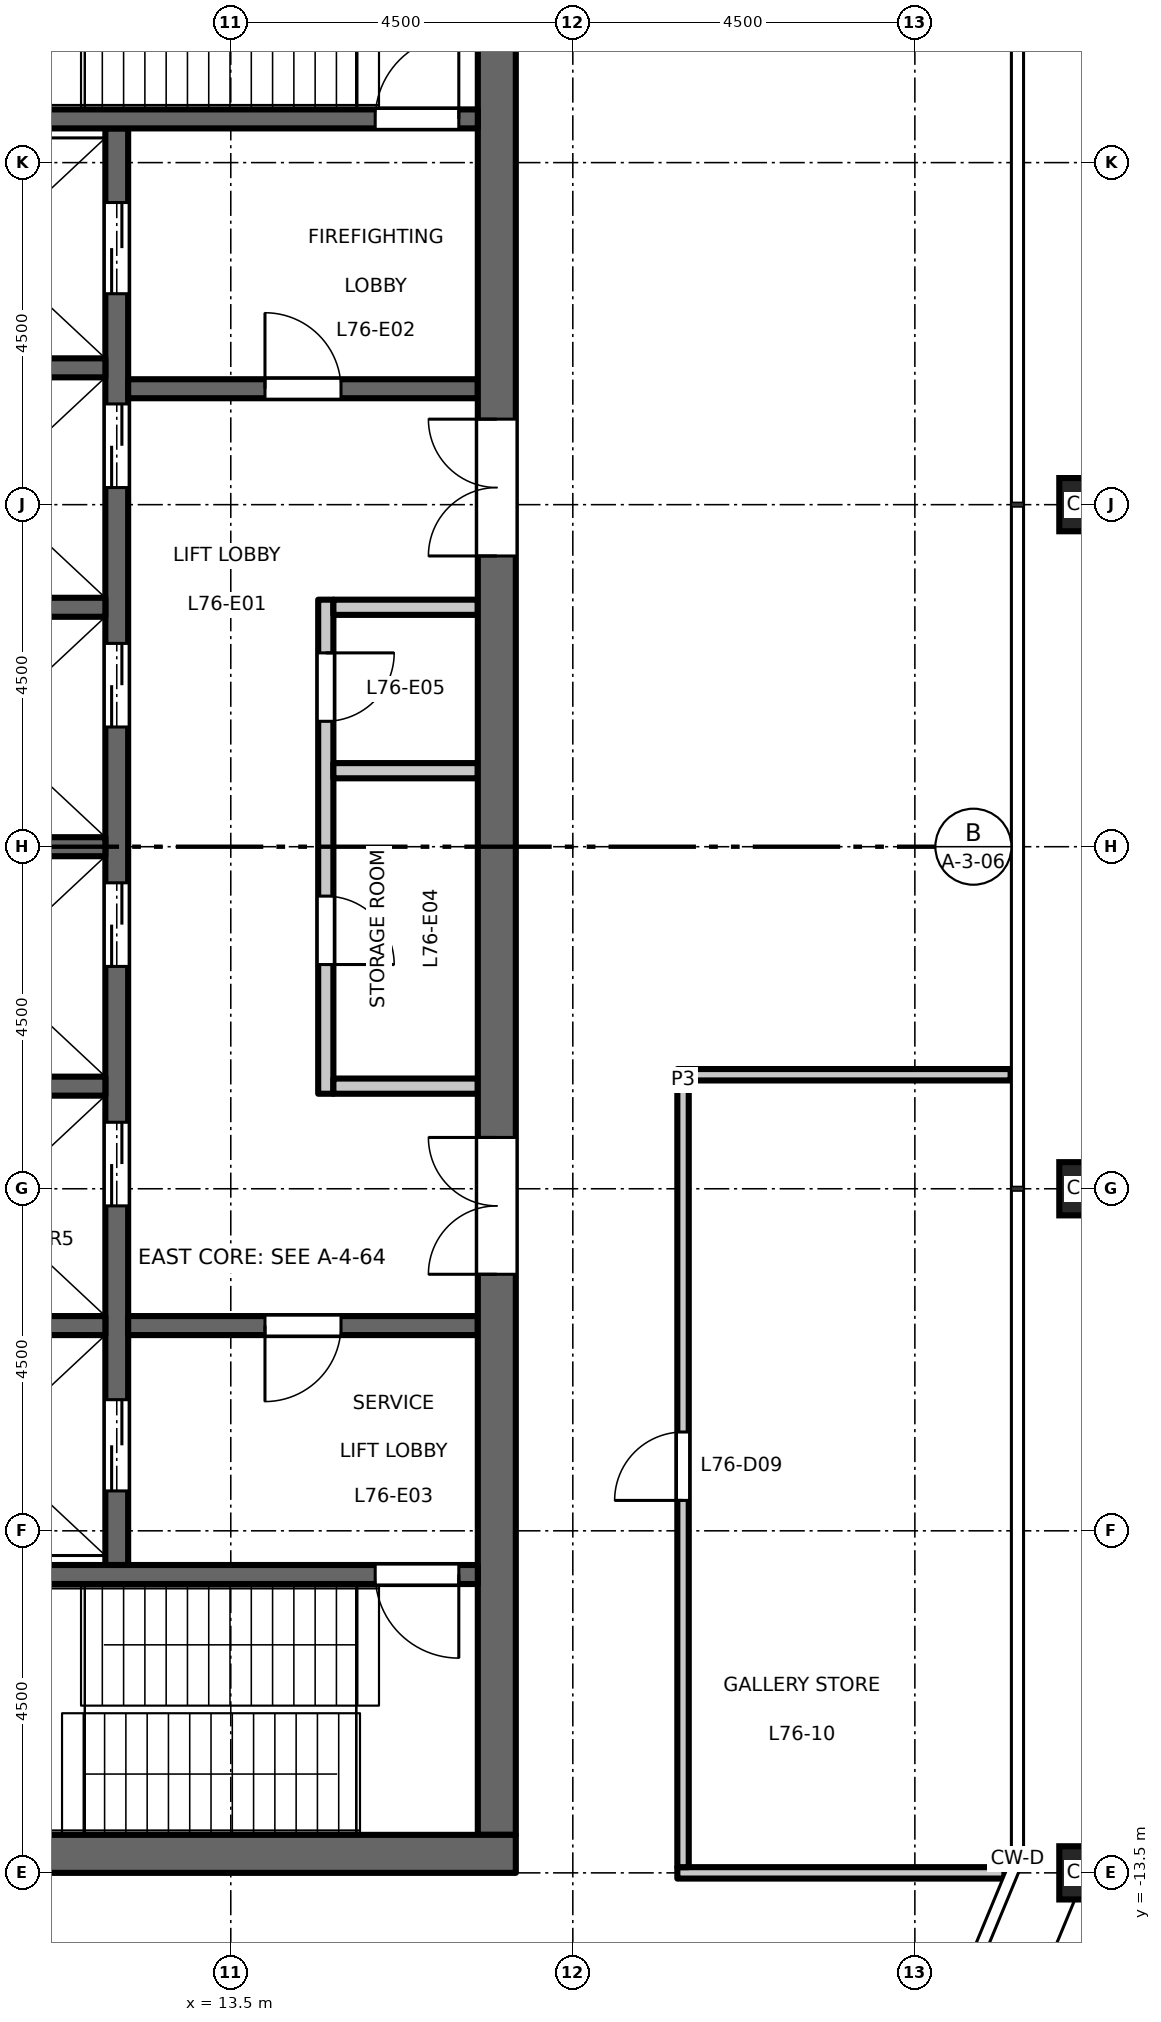
"""IFC4 building model, lengths in metres.
Left out: names, types, materials, properties, quantities, classifications, styles, units other than length and angle.
Written with IfcOpenShell. Run it as: python <this file> out.ifc"""

import sys

from ifc_helpers import new_model, si_unit, direction, frame, frame_2d, origin, origin_2d, place, context, subcontext, project, spatial, rectangle, hollow_rectangle, extrude, element, fill, save


model = new_model("IFC4")
c1 = context("Model", 3, precision=1e-05, world=origin(), true_north=direction((0.0, 1.0)))
c2 = subcontext(c1, "Body", "Model", "MODEL_VIEW")
j1 = project(units=[si_unit("LENGTHUNIT", "METRE"), si_unit("PLANEANGLEUNIT", "RADIAN")], contexts=[c1])
p1 = place(None, origin())
s1 = spatial("IfcSite", under=j1, at=p1, CompositionType="ELEMENT")
p2 = place(p1, origin())
s2 = spatial("IfcBuilding", under=s1, at=p2, CompositionType="ELEMENT")
p3 = place(p2, frame((0.0, 0.0, 353.2)))
s3 = spatial("IfcBuildingStorey", under=s2, at=p3, CompositionType="ELEMENT", Elevation=353.2)
for number, where, z_axis, x_axis in (
    (1, (24.75, -13.5, 0.0), (0.0, 0.0, 1.0), (1.0, 0.0, 0.0)),
    (2, (24.75, -4.5, 0.0), (0.0, 0.0, 1.0), (1.0, 0.0, 0.0)),
    (3, (24.75, 4.5, 0.0), (0.0, 0.0, 1.0), (1.0, 0.0, 0.0)),
):
    element("IfcColumn", number, at=place(p3, frame(where, z_axis=z_axis, x_axis=x_axis)), inside=s3, PredefinedType="COLUMN", context=c2, shape_type="SweptSolid", body=[
        extrude(hollow_rectangle(XDim=0.7, YDim=0.7, WallThickness=0.036, at=origin_2d()), origin(), (0.0, 0.0, 1.0), 5.0),
    ])
p4 = place(p3, frame((14.75, -3.25, 0.0), z_axis=(0.0, 0.0, 1.0), x_axis=(0.0, 1.0, 0.0)))
e4 = element("IfcWall", 4, at=p4, inside=s3, PredefinedType="PARTITIONING", context=c2, shape_type="SweptSolid", body=[
    extrude(rectangle(XDim=6.5, YDim=0.2, at=frame_2d((3.25, 0.0))), origin(), (0.0, 0.0, 1.0), 4.8),
])
p5 = place(p4, frame((1.7, 0.0, 0.0)))
e5 = element("IfcOpeningElement", 5, at=p5, cuts=e4, PredefinedType="OPENING", context=c2, shape_type="SweptSolid", body=[
    extrude(rectangle(XDim=0.9, YDim=2.1, at=frame_2d((0.45, 1.05))), frame((0.0, 0.11, 0.0), z_axis=(0.0, -1.0, 0.0), x_axis=(1.0, 0.0, 0.0)), (0.0, 0.0, 1.0), 0.22),
])
p6 = place(p4, frame((4.9, 0.0, 0.0)))
e6 = element("IfcOpeningElement", 6, at=p6, cuts=e4, PredefinedType="OPENING", context=c2, shape_type="SweptSolid", body=[
    extrude(rectangle(XDim=0.9, YDim=2.1, at=frame_2d((0.45, 1.05))), frame((0.0, 0.11, 0.0), z_axis=(0.0, -1.0, 0.0), x_axis=(1.0, 0.0, 0.0)), (0.0, 0.0, 1.0), 0.22),
])
for number, where, z_axis, x_axis in (
    (7, (14.85, 3.15, 0.0), (0.0, 0.0, 1.0), (1.0, 0.0, 0.0)),
    (8, (14.85, -3.15, 0.0), (0.0, 0.0, 1.0), (1.0, 0.0, 0.0)),
    (9, (14.85, 1.0, 0.0), (0.0, 0.0, 1.0), (1.0, 0.0, 0.0)),
):
    element("IfcWall", number, at=place(p3, frame(where, z_axis=z_axis, x_axis=x_axis)), inside=s3, PredefinedType="PARTITIONING", context=c2, shape_type="SweptSolid", body=[
        extrude(rectangle(XDim=1.9, YDim=0.2, at=frame_2d((0.95, 0.0))), origin(), (0.0, 0.0, 1.0), 4.8),
    ])
p7 = place(p3, frame((12.0, -9.45, 0.0), z_axis=(0.0, 0.0, 1.0), x_axis=(0.0, 1.0, 0.0)))
e10 = element("IfcWall", 10, at=p7, inside=s3, PredefinedType="SHEAR", context=c2, shape_type="SweptSolid", body=[
    extrude(rectangle(XDim=18.9, YDim=0.3, at=frame_2d((9.45, 0.0))), origin(), (0.0, 0.0, 1.0), 4.8),
])
p8 = place(p7, frame((4.725, 0.0, 0.0)))
e11 = element("IfcOpeningElement", 11, at=p8, cuts=e10, PredefinedType="OPENING", context=c2, shape_type="SweptSolid", body=[
    extrude(rectangle(XDim=1.1, YDim=2.1, at=frame_2d((0.55, 1.05))), frame((0.0, 0.16, 0.0), z_axis=(0.0, -1.0, 0.0), x_axis=(1.0, 0.0, 0.0)), (0.0, 0.0, 1.0), 0.32),
])
p9 = place(p7, frame((7.875, 0.0, 0.0)))
e12 = element("IfcOpeningElement", 12, at=p9, cuts=e10, PredefinedType="OPENING", context=c2, shape_type="SweptSolid", body=[
    extrude(rectangle(XDim=1.1, YDim=2.1, at=frame_2d((0.55, 1.05))), frame((0.0, 0.16, 0.0), z_axis=(0.0, -1.0, 0.0), x_axis=(1.0, 0.0, 0.0)), (0.0, 0.0, 1.0), 0.32),
])
p10 = place(p7, frame((11.025, 0.0, 0.0)))
e13 = element("IfcOpeningElement", 13, at=p10, cuts=e10, PredefinedType="OPENING", context=c2, shape_type="SweptSolid", body=[
    extrude(rectangle(XDim=1.1, YDim=2.1, at=frame_2d((0.55, 1.05))), frame((0.0, 0.16, 0.0), z_axis=(0.0, -1.0, 0.0), x_axis=(1.0, 0.0, 0.0)), (0.0, 0.0, 1.0), 0.32),
])
p11 = place(p7, frame((14.175, 0.0, 0.0)))
e14 = element("IfcOpeningElement", 14, at=p11, cuts=e10, PredefinedType="OPENING", context=c2, shape_type="SweptSolid", body=[
    extrude(rectangle(XDim=1.1, YDim=2.1, at=frame_2d((0.55, 1.05))), frame((0.0, 0.16, 0.0), z_axis=(0.0, -1.0, 0.0), x_axis=(1.0, 0.0, 0.0)), (0.0, 0.0, 1.0), 0.32),
])
p12 = place(p7, frame((16.725, 0.0, 0.0)))
e15 = element("IfcOpeningElement", 15, at=p12, cuts=e10, PredefinedType="OPENING", context=c2, shape_type="SweptSolid", body=[
    extrude(rectangle(XDim=1.2, YDim=2.1, at=frame_2d((0.6, 1.05))), frame((0.0, 0.16, 0.0), z_axis=(0.0, -1.0, 0.0), x_axis=(1.0, 0.0, 0.0)), (0.0, 0.0, 1.0), 0.32),
])
p13 = place(p7, frame((0.975, 0.0, 0.0)))
e16 = element("IfcOpeningElement", 16, at=p13, cuts=e10, PredefinedType="OPENING", context=c2, shape_type="SweptSolid", body=[
    extrude(rectangle(XDim=1.2, YDim=2.1, at=frame_2d((0.6, 1.05))), frame((0.0, 0.16, 0.0), z_axis=(0.0, -1.0, 0.0), x_axis=(1.0, 0.0, 0.0)), (0.0, 0.0, 1.0), 0.32),
])
p14 = place(p3, frame((12.15, 6.025, 0.0), z_axis=(0.0, 0.0, 1.0), x_axis=(1.0, 0.0, 0.0)))
e17 = element("IfcWall", 17, at=p14, inside=s3, PredefinedType="SHEAR", context=c2, shape_type="SweptSolid", body=[
    extrude(rectangle(XDim=4.6, YDim=0.25, at=frame_2d((2.3, 0.0))), origin(), (0.0, 0.0, 1.0), 4.8),
])
p15 = place(p14, frame((1.8, 0.0, 0.0)))
e18 = element("IfcOpeningElement", 18, at=p15, cuts=e17, PredefinedType="OPENING", context=c2, shape_type="SweptSolid", body=[
    extrude(rectangle(XDim=1.0, YDim=2.1, at=frame_2d((0.5, 1.05))), frame((0.0, 0.135, 0.0), z_axis=(0.0, -1.0, 0.0), x_axis=(1.0, 0.0, 0.0)), (0.0, 0.0, 1.0), 0.27),
])
p16 = place(p3, frame((12.15, -6.3, 0.0), z_axis=(0.0, 0.0, 1.0), x_axis=(1.0, 0.0, 0.0)))
e19 = element("IfcWall", 19, at=p16, inside=s3, PredefinedType="SHEAR", context=c2, shape_type="SweptSolid", body=[
    extrude(rectangle(XDim=4.6, YDim=0.25, at=frame_2d((2.3, 0.0))), origin(), (0.0, 0.0, 1.0), 4.8),
])
p17 = place(p16, frame((1.8, 0.0, 0.0)))
e20 = element("IfcOpeningElement", 20, at=p17, cuts=e19, PredefinedType="OPENING", context=c2, shape_type="SweptSolid", body=[
    extrude(rectangle(XDim=1.0, YDim=2.1, at=frame_2d((0.5, 1.05))), frame((0.0, 0.135, 0.0), z_axis=(0.0, -1.0, 0.0), x_axis=(1.0, 0.0, 0.0)), (0.0, 0.0, 1.0), 0.27),
])
p18 = place(p3, frame((17.0, -13.0, 0.0), z_axis=(0.0, 0.0, 1.0), x_axis=(0.0, 1.0, 0.0)))
e21 = element("IfcWall", 21, at=p18, inside=s3, PredefinedType="SHEAR", context=c2, shape_type="SweptSolid", body=[
    extrude(rectangle(XDim=26.0, YDim=0.5, at=frame_2d((13.0, 0.0))), origin(), (0.0, 0.0, 1.0), 4.8),
])
p19 = place(p18, frame((16.825, 0.0, 0.0)))
e22 = element("IfcOpeningElement", 22, at=p19, cuts=e21, PredefinedType="OPENING", context=c2, shape_type="SweptSolid", body=[
    extrude(rectangle(XDim=1.8, YDim=2.1, at=frame_2d((0.9, 1.05))), frame((0.0, 0.26, 0.0), z_axis=(0.0, -1.0, 0.0), x_axis=(1.0, 0.0, 0.0)), (0.0, 0.0, 1.0), 0.52),
])
p20 = place(p18, frame((7.375, 0.0, 0.0)))
e23 = element("IfcOpeningElement", 23, at=p20, cuts=e21, PredefinedType="OPENING", context=c2, shape_type="SweptSolid", body=[
    extrude(rectangle(XDim=1.8, YDim=2.1, at=frame_2d((0.9, 1.05))), frame((0.0, 0.26, 0.0), z_axis=(0.0, -1.0, 0.0), x_axis=(1.0, 0.0, 0.0)), (0.0, 0.0, 1.0), 0.52),
])
for number, where, z_axis, x_axis in (
    (24, (8.75, 0.0, 0.0), (0.0, 0.0, 1.0), (1.0, 0.0, 0.0)),
    (25, (8.75, 3.15, 0.0), (0.0, 0.0, 1.0), (1.0, 0.0, 0.0)),
    (26, (8.75, 6.3, 0.0), (0.0, 0.0, 1.0), (1.0, 0.0, 0.0)),
    (27, (8.75, -3.15, 0.0), (0.0, 0.0, 1.0), (1.0, 0.0, 0.0)),
    (28, (8.75, -6.3, 0.0), (0.0, 0.0, 1.0), (1.0, 0.0, 0.0)),
):
    element("IfcWall", number, at=place(p3, frame(where, z_axis=z_axis, x_axis=x_axis)), inside=s3, PredefinedType="SHEAR", context=c2, shape_type="SweptSolid", body=[
        extrude(rectangle(XDim=3.1, YDim=0.25, at=frame_2d((1.55, 0.0))), origin(), (0.0, 0.0, 1.0), 4.8),
    ])
p21 = place(p3, frame((8.75, 9.575, 0.0), z_axis=(0.0, 0.0, 1.0), x_axis=(1.0, 0.0, 0.0)))
e29 = element("IfcWall", 29, at=p21, inside=s3, PredefinedType="SHEAR", context=c2, shape_type="SweptSolid", body=[
    extrude(rectangle(XDim=8.0, YDim=0.25, at=frame_2d((4.0, 0.0))), origin(), (0.0, 0.0, 1.0), 4.8),
])
p22 = place(p21, frame((6.65, 0.0, 0.0)))
e30 = element("IfcOpeningElement", 30, at=p22, cuts=e29, PredefinedType="OPENING", context=c2, shape_type="SweptSolid", body=[
    extrude(rectangle(XDim=1.1, YDim=2.1, at=frame_2d((0.55, 1.05))), frame((0.0, 0.135, 0.0), z_axis=(0.0, -1.0, 0.0), x_axis=(1.0, 0.0, 0.0)), (0.0, 0.0, 1.0), 0.27),
])
p23 = place(p3, frame((8.75, -9.575, 0.0), z_axis=(0.0, 0.0, 1.0), x_axis=(1.0, 0.0, 0.0)))
e31 = element("IfcWall", 31, at=p23, inside=s3, PredefinedType="SHEAR", context=c2, shape_type="SweptSolid", body=[
    extrude(rectangle(XDim=8.0, YDim=0.25, at=frame_2d((4.0, 0.0))), origin(), (0.0, 0.0, 1.0), 4.8),
])
p24 = place(p23, frame((6.65, 0.0, 0.0)))
e32 = element("IfcOpeningElement", 32, at=p24, cuts=e31, PredefinedType="OPENING", context=c2, shape_type="SweptSolid", body=[
    extrude(rectangle(XDim=1.1, YDim=2.1, at=frame_2d((0.55, 1.05))), frame((0.0, 0.135, 0.0), z_axis=(0.0, -1.0, 0.0), x_axis=(1.0, 0.0, 0.0)), (0.0, 0.0, 1.0), 0.27),
])
p25 = place(p3, frame((8.25, -13.25, 0.0), z_axis=(0.0, 0.0, 1.0), x_axis=(1.0, 0.0, 0.0)))
e33 = element("IfcWall", 33, at=p25, inside=s3, PredefinedType="SHEAR", context=c2, shape_type="SweptSolid", body=[
    extrude(rectangle(XDim=9.0, YDim=0.5, at=frame_2d((4.5, 0.0))), origin(), (0.0, 0.0, 1.0), 4.8),
])
p26 = place(p3, frame((19.375, -13.5, 0.0), z_axis=(0.0, 0.0, 1.0), x_axis=(1.0, 0.0, 0.0)))
e34 = element("IfcWall", 34, at=p26, inside=s3, PredefinedType="PARTITIONING", context=c2, shape_type="SweptSolid", body=[
    extrude(rectangle(XDim=4.303, YDim=0.15, at=frame_2d((2.151, 0.0))), origin(), (0.0, 0.0, 1.0), 4.8),
])
p27 = place(p3, frame((19.375, -3.0, 0.0), z_axis=(0.0, 0.0, 1.0), x_axis=(1.0, 0.0, 0.0)))
e35 = element("IfcWall", 35, at=p27, inside=s3, PredefinedType="PARTITIONING", context=c2, shape_type="SweptSolid", body=[
    extrude(rectangle(XDim=4.385, YDim=0.15, at=frame_2d((2.192, 0.0))), origin(), (0.0, 0.0, 1.0), 4.8),
])
p28 = place(p3, frame((19.45, -13.425, 0.0), z_axis=(0.0, 0.0, 1.0), x_axis=(0.0, 1.0, 0.0)))
e36 = element("IfcWall", 36, at=p28, inside=s3, PredefinedType="PARTITIONING", context=c2, shape_type="SweptSolid", body=[
    extrude(rectangle(XDim=10.35, YDim=0.15, at=frame_2d((5.175, 0.0))), origin(), (0.0, 0.0, 1.0), 4.8),
])
p29 = place(p28, frame((4.825, 0.0, 0.0)))
e37 = element("IfcOpeningElement", 37, at=p29, cuts=e36, PredefinedType="OPENING", context=c2, shape_type="SweptSolid", body=[
    extrude(rectangle(XDim=0.9, YDim=2.1, at=frame_2d((0.45, 1.05))), frame((0.0, 0.085, 0.0), z_axis=(0.0, -1.0, 0.0), x_axis=(1.0, 0.0, 0.0)), (0.0, 0.0, 1.0), 0.17),
])
p30 = place(p15, origin())
e38 = element("IfcDoor", 38, at=p30, inside=s3, OperationType="SINGLE_SWING_RIGHT", PredefinedType="DOOR", context=c2, shape_type="SweptSolid", body=[
    extrude(rectangle(XDim=1.0, YDim=2.1, at=frame_2d((0.5, 1.05))), frame((0.0, 0.025, 0.0), z_axis=(0.0, -1.0, 0.0), x_axis=(1.0, 0.0, 0.0)), (0.0, 0.0, 1.0), 0.05),
])
fill(e18, e38)
p31 = place(p17, origin())
e39 = element("IfcDoor", 39, at=p31, inside=s3, OperationType="SINGLE_SWING_LEFT", PredefinedType="DOOR", context=c2, shape_type="SweptSolid", body=[
    extrude(rectangle(XDim=1.0, YDim=2.1, at=frame_2d((0.5, 1.05))), frame((0.0, 0.025, 0.0), z_axis=(0.0, -1.0, 0.0), x_axis=(1.0, 0.0, 0.0)), (0.0, 0.0, 1.0), 0.05),
])
fill(e20, e39)
p32 = place(p22, origin())
e40 = element("IfcDoor", 40, at=p32, inside=s3, OperationType="SINGLE_SWING_LEFT", PredefinedType="DOOR", context=c2, shape_type="SweptSolid", body=[
    extrude(rectangle(XDim=1.1, YDim=2.1, at=frame_2d((0.55, 1.05))), frame((0.0, 0.025, 0.0), z_axis=(0.0, -1.0, 0.0), x_axis=(1.0, 0.0, 0.0)), (0.0, 0.0, 1.0), 0.05),
])
fill(e30, e40)
p33 = place(p24, origin())
e41 = element("IfcDoor", 41, at=p33, inside=s3, OperationType="SINGLE_SWING_RIGHT", PredefinedType="DOOR", context=c2, shape_type="SweptSolid", body=[
    extrude(rectangle(XDim=1.1, YDim=2.1, at=frame_2d((0.55, 1.05))), frame((0.0, 0.025, 0.0), z_axis=(0.0, -1.0, 0.0), x_axis=(1.0, 0.0, 0.0)), (0.0, 0.0, 1.0), 0.05),
])
fill(e32, e41)
p34 = place(p19, origin())
e42 = element("IfcDoor", 42, at=p34, inside=s3, OperationType="DOUBLE_DOOR_DOUBLE_SWING", PredefinedType="DOOR", context=c2, shape_type="SweptSolid", body=[
    extrude(rectangle(XDim=1.8, YDim=2.1, at=frame_2d((0.9, 1.05))), frame((0.0, 0.025, 0.0), z_axis=(0.0, -1.0, 0.0), x_axis=(1.0, 0.0, 0.0)), (0.0, 0.0, 1.0), 0.05),
])
fill(e22, e42)
p35 = place(p20, origin())
e43 = element("IfcDoor", 43, at=p35, inside=s3, OperationType="DOUBLE_DOOR_DOUBLE_SWING", PredefinedType="DOOR", context=c2, shape_type="SweptSolid", body=[
    extrude(rectangle(XDim=1.8, YDim=2.1, at=frame_2d((0.9, 1.05))), frame((0.0, 0.025, 0.0), z_axis=(0.0, -1.0, 0.0), x_axis=(1.0, 0.0, 0.0)), (0.0, 0.0, 1.0), 0.05),
])
fill(e23, e43)
p36 = place(p8, origin())
e44 = element("IfcDoor", 44, at=p36, inside=s3, OperationType="DOUBLE_DOOR_SLIDING", PredefinedType="DOOR", context=c2, shape_type="SweptSolid", body=[
    extrude(rectangle(XDim=1.1, YDim=2.1, at=frame_2d((0.55, 1.05))), frame((0.0, 0.025, 0.0), z_axis=(0.0, -1.0, 0.0), x_axis=(1.0, 0.0, 0.0)), (0.0, 0.0, 1.0), 0.05),
])
fill(e11, e44)
p37 = place(p9, origin())
e45 = element("IfcDoor", 45, at=p37, inside=s3, OperationType="DOUBLE_DOOR_SLIDING", PredefinedType="DOOR", context=c2, shape_type="SweptSolid", body=[
    extrude(rectangle(XDim=1.1, YDim=2.1, at=frame_2d((0.55, 1.05))), frame((0.0, 0.025, 0.0), z_axis=(0.0, -1.0, 0.0), x_axis=(1.0, 0.0, 0.0)), (0.0, 0.0, 1.0), 0.05),
])
fill(e12, e45)
p38 = place(p10, origin())
e46 = element("IfcDoor", 46, at=p38, inside=s3, OperationType="DOUBLE_DOOR_SLIDING", PredefinedType="DOOR", context=c2, shape_type="SweptSolid", body=[
    extrude(rectangle(XDim=1.1, YDim=2.1, at=frame_2d((0.55, 1.05))), frame((0.0, 0.025, 0.0), z_axis=(0.0, -1.0, 0.0), x_axis=(1.0, 0.0, 0.0)), (0.0, 0.0, 1.0), 0.05),
])
fill(e13, e46)
p39 = place(p11, origin())
e47 = element("IfcDoor", 47, at=p39, inside=s3, OperationType="DOUBLE_DOOR_SLIDING", PredefinedType="DOOR", context=c2, shape_type="SweptSolid", body=[
    extrude(rectangle(XDim=1.1, YDim=2.1, at=frame_2d((0.55, 1.05))), frame((0.0, 0.025, 0.0), z_axis=(0.0, -1.0, 0.0), x_axis=(1.0, 0.0, 0.0)), (0.0, 0.0, 1.0), 0.05),
])
fill(e14, e47)
p40 = place(p12, origin())
e48 = element("IfcDoor", 48, at=p40, inside=s3, OperationType="DOUBLE_DOOR_SLIDING", PredefinedType="DOOR", context=c2, shape_type="SweptSolid", body=[
    extrude(rectangle(XDim=1.2, YDim=2.1, at=frame_2d((0.6, 1.05))), frame((0.0, 0.025, 0.0), z_axis=(0.0, -1.0, 0.0), x_axis=(1.0, 0.0, 0.0)), (0.0, 0.0, 1.0), 0.05),
])
fill(e15, e48)
p41 = place(p13, origin())
e49 = element("IfcDoor", 49, at=p41, inside=s3, OperationType="DOUBLE_DOOR_SLIDING", PredefinedType="DOOR", context=c2, shape_type="SweptSolid", body=[
    extrude(rectangle(XDim=1.2, YDim=2.1, at=frame_2d((0.6, 1.05))), frame((0.0, 0.025, 0.0), z_axis=(0.0, -1.0, 0.0), x_axis=(1.0, 0.0, 0.0)), (0.0, 0.0, 1.0), 0.05),
])
fill(e16, e49)
p42 = place(p5, origin())
e50 = element("IfcDoor", 50, at=p42, inside=s3, OperationType="SINGLE_SWING_LEFT", PredefinedType="DOOR", context=c2, shape_type="SweptSolid", body=[
    extrude(rectangle(XDim=0.9, YDim=2.1, at=frame_2d((0.45, 1.05))), frame((0.0, 0.025, 0.0), z_axis=(0.0, -1.0, 0.0), x_axis=(1.0, 0.0, 0.0)), (0.0, 0.0, 1.0), 0.05),
])
fill(e5, e50)
p43 = place(p6, origin())
e51 = element("IfcDoor", 51, at=p43, inside=s3, OperationType="SINGLE_SWING_RIGHT", PredefinedType="DOOR", context=c2, shape_type="SweptSolid", body=[
    extrude(rectangle(XDim=0.9, YDim=2.1, at=frame_2d((0.45, 1.05))), frame((0.0, 0.025, 0.0), z_axis=(0.0, -1.0, 0.0), x_axis=(1.0, 0.0, 0.0)), (0.0, 0.0, 1.0), 0.05),
])
fill(e6, e51)
p44 = place(p29, origin())
e52 = element("IfcDoor", 52, at=p44, inside=s3, OperationType="SINGLE_SWING_LEFT", PredefinedType="DOOR", context=c2, shape_type="SweptSolid", body=[
    extrude(rectangle(XDim=0.9, YDim=2.1, at=frame_2d((0.45, 1.05))), frame((0.0, 0.025, 0.0), z_axis=(0.0, -1.0, 0.0), x_axis=(1.0, 0.0, 0.0)), (0.0, 0.0, 1.0), 0.05),
])
fill(e37, e52)
save(model, sys.argv[1])
